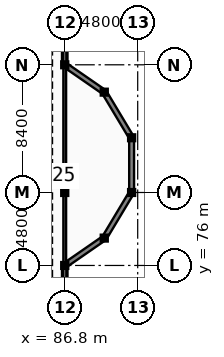
"""IFC4 building model, lengths in metres.
Left out: names, types, materials, properties, quantities, classifications, styles, units other than length and angle.
Written with IfcOpenShell. Run it as: python <this file> out.ifc"""

import sys

from ifc_helpers import new_model, si_unit, direction, frame, frame_2d, origin, origin_2d, place, context, subcontext, project, spatial, rectangle, i_section, extrude, element, fill, save


model = new_model("IFC4")
c1 = context("Model", 3, precision=1e-05, world=origin(), true_north=direction((0.0, 1.0)))
c2 = subcontext(c1, "Body", "Model", "MODEL_VIEW")
j1 = project(units=[si_unit("LENGTHUNIT", "METRE"), si_unit("PLANEANGLEUNIT", "RADIAN")], contexts=[c1])
p1 = place(None, origin())
s1 = spatial("IfcSite", under=j1, at=p1, CompositionType="ELEMENT")
p2 = place(p1, origin())
s2 = spatial("IfcBuilding", under=s1, at=p2, CompositionType="ELEMENT")
p3 = place(p2, frame((0.0, 0.0, 21.6)))
s3 = spatial("IfcBuildingStorey", under=s2, at=p3, CompositionType="ELEMENT", Elevation=21.6)
for number, where, z_axis, x_axis in (
    (1, (86.8, 76.0, 0.0), (0.0, 0.0, 1.0), (1.0, 0.0, 0.0)),
    (2, (86.8, 80.8, 0.0), (0.0, 0.0, 1.0), (1.0, 0.0, 0.0)),
    (3, (86.8, 89.2, 0.0), (0.0, 0.0, 1.0), (1.0, 0.0, 0.0)),
    (4, (89.4, 77.8, 0.0), (0.0, 0.0, 1.0), (1.0, 0.0, 0.0)),
    (5, (89.4, 87.4, 0.0), (0.0, 0.0, 1.0), (1.0, 0.0, 0.0)),
    (6, (91.2, 80.8, 0.0), (0.0, 0.0, 1.0), (1.0, 0.0, 0.0)),
    (7, (91.2, 84.4, 0.0), (0.0, 0.0, 1.0), (1.0, 0.0, 0.0)),
):
    element("IfcColumn", number, at=place(p3, frame(where, z_axis=z_axis, x_axis=x_axis)), inside=s3, PredefinedType="COLUMN", context=c2, shape_type="SweptSolid", body=[
        extrude(i_section(OverallWidth=0.3, OverallDepth=0.29, WebThickness=0.009, FlangeThickness=0.014, at=origin_2d()), origin(), (0.0, 0.0, 1.0), 3.6),
    ])
p4 = place(p3, frame((86.8, 76.0, 0.0), z_axis=(0.0, 0.0, 1.0), x_axis=(0.0, 1.0, 0.0)))
e8 = element("IfcWall", 8, at=p4, inside=s3, PredefinedType="PARTITIONING", context=c2, shape_type="SweptSolid", body=[
    extrude(rectangle(XDim=13.2, YDim=0.18, at=frame_2d((6.6, 0.0))), origin(), (0.0, 0.0, 1.0), 2.71),
])
p5 = place(p4, frame((5.8, 0.0, -0.01)))
e9 = element("IfcOpeningElement", 9, at=p5, cuts=e8, PredefinedType="OPENING", context=c2, shape_type="SweptSolid", body=[
    extrude(rectangle(XDim=1.6, YDim=2.21, at=frame_2d((0.8, 1.105))), frame((0.0, 0.1, 0.0), z_axis=(0.0, -1.0, 0.0), x_axis=(1.0, 0.0, 0.0)), (0.0, 0.0, 1.0), 0.2),
])
p6 = place(p3, frame((86.8, 67.6, 0.0), z_axis=(0.0, 0.0, 1.0), x_axis=(0.0, 1.0, 0.0)))
e10 = element("IfcWall", 10, at=p6, inside=s3, PredefinedType="SOLIDWALL", context=c2, shape_type="SweptSolid", body=[
    extrude(rectangle(XDim=8.4, YDim=0.36, at=frame_2d((4.2, 0.0))), origin(), (0.0, 0.0, 1.0), 2.71),
])
p7 = place(p6, frame((0.46, 0.0, 0.75)))
e11 = element("IfcOpeningElement", 11, at=p7, cuts=e10, PredefinedType="OPENING", context=c2, shape_type="SweptSolid", body=[
    extrude(rectangle(XDim=1.55, YDim=1.82, at=frame_2d((0.775, 0.91))), frame((0.0, 0.19, 0.0), z_axis=(0.0, -1.0, 0.0), x_axis=(1.0, 0.0, 0.0)), (0.0, 0.0, 1.0), 0.38),
])
p8 = place(p6, frame((6.26, 0.0, 0.75)))
e12 = element("IfcOpeningElement", 12, at=p8, cuts=e10, PredefinedType="OPENING", context=c2, shape_type="SweptSolid", body=[
    extrude(rectangle(XDim=1.55, YDim=1.82, at=frame_2d((0.775, 0.91))), frame((0.0, 0.19, 0.0), z_axis=(0.0, -1.0, 0.0), x_axis=(1.0, 0.0, 0.0)), (0.0, 0.0, 1.0), 0.38),
])
p9 = place(p3, frame((86.8, 89.2, 0.0), z_axis=(0.0, 0.0, 1.0), x_axis=(0.0, 1.0, 0.0)))
e13 = element("IfcWall", 13, at=p9, inside=s3, PredefinedType="SOLIDWALL", context=c2, shape_type="SweptSolid", body=[
    extrude(rectangle(XDim=8.4, YDim=0.36, at=frame_2d((4.2, 0.0))), origin(), (0.0, 0.0, 1.0), 2.71),
])
p10 = place(p9, frame((0.46, 0.0, 0.75)))
e14 = element("IfcOpeningElement", 14, at=p10, cuts=e13, PredefinedType="OPENING", context=c2, shape_type="SweptSolid", body=[
    extrude(rectangle(XDim=1.55, YDim=1.82, at=frame_2d((0.775, 0.91))), frame((0.0, 0.19, 0.0), z_axis=(0.0, -1.0, 0.0), x_axis=(1.0, 0.0, 0.0)), (0.0, 0.0, 1.0), 0.38),
])
p11 = place(p9, frame((6.26, 0.0, 0.75)))
e15 = element("IfcOpeningElement", 15, at=p11, cuts=e13, PredefinedType="OPENING", context=c2, shape_type="SweptSolid", body=[
    extrude(rectangle(XDim=1.55, YDim=1.82, at=frame_2d((0.775, 0.91))), frame((0.0, 0.19, 0.0), z_axis=(0.0, -1.0, 0.0), x_axis=(1.0, 0.0, 0.0)), (0.0, 0.0, 1.0), 0.38),
])
p12 = place(p3, frame((87.03, 76.159, 0.0), z_axis=(0.0, 0.0, 1.0), x_axis=(0.822192191644, 0.56920997883, 0.0)))
e16 = element("IfcWall", 16, at=p12, inside=s3, PredefinedType="SOLIDWALL", context=c2, shape_type="SweptSolid", body=[
    extrude(rectangle(XDim=0.22, YDim=0.24, at=frame_2d((0.11, 0.0))), origin(), (0.0, 0.0, 1.0), 2.71),
])
p13 = place(p3, frame((89.121, 77.606, 0.0), z_axis=(0.0, 0.0, 1.0), x_axis=(0.821855834467, 0.569695521619, 0.0)))
e17 = element("IfcWall", 17, at=p13, inside=s3, PredefinedType="SOLIDWALL", context=c2, shape_type="SweptSolid", body=[
    extrude(rectangle(XDim=0.34, YDim=0.24, at=frame_2d((0.17, 0.0))), origin(), (0.0, 0.0, 1.0), 2.71),
])
p14 = place(p3, frame((89.4, 77.8, 0.0), z_axis=(0.0, 0.0, 1.0), x_axis=(0.514812489021, 0.857302805984, 0.0)))
e18 = element("IfcWall", 18, at=p14, inside=s3, PredefinedType="SOLIDWALL", context=c2, shape_type="SweptSolid", body=[
    extrude(rectangle(XDim=0.34, YDim=0.24, at=frame_2d((0.17, 0.0))), origin(), (0.0, 0.0, 1.0), 2.71),
])
for number, where, z_axis, x_axis in (
    (19, (91.025, 80.509, 0.0), (0.0, 0.0, 1.0), (0.514, 0.858, 0.0)),
    (20, (91.2, 80.8, 0.0), (0.0, 0.0, 1.0), (0.0, 1.0, 0.0)),
    (21, (91.2, 84.06, 0.0), (0.0, 0.0, 1.0), (0.0, 1.0, 0.0)),
    (22, (91.2, 84.4, 0.0), (0.0, 0.0, 1.0), (-0.514, 0.858, 0.0)),
):
    element("IfcWall", number, at=place(p3, frame(where, z_axis=z_axis, x_axis=x_axis)), inside=s3, PredefinedType="SOLIDWALL", context=c2, shape_type="SweptSolid", body=[
        extrude(rectangle(XDim=0.34, YDim=0.24, at=frame_2d((0.17, 0.0))), origin(), (0.0, 0.0, 1.0), 2.71),
    ])
p15 = place(p3, frame((89.575, 87.108, 0.0), z_axis=(0.0, 0.0, 1.0), x_axis=(-0.514812489021, 0.857302805984, 0.0)))
e23 = element("IfcWall", 23, at=p15, inside=s3, PredefinedType="SOLIDWALL", context=c2, shape_type="SweptSolid", body=[
    extrude(rectangle(XDim=0.34, YDim=0.24, at=frame_2d((0.17, 0.0))), origin(), (0.0, 0.0, 1.0), 2.71),
])
p16 = place(p3, frame((89.4, 87.4, 0.0), z_axis=(0.0, 0.0, 1.0), x_axis=(-0.821855834467, 0.569695521619, 0.0)))
e24 = element("IfcWall", 24, at=p16, inside=s3, PredefinedType="SOLIDWALL", context=c2, shape_type="SweptSolid", body=[
    extrude(rectangle(XDim=0.34, YDim=0.24, at=frame_2d((0.17, 0.0))), origin(), (0.0, 0.0, 1.0), 2.71),
])
p17 = place(p3, frame((87.211, 88.915, 0.0), z_axis=(0.0, 0.0, 1.0), x_axis=(-0.822192191644, 0.56920997883, 0.0)))
e25 = element("IfcWall", 25, at=p17, inside=s3, PredefinedType="SOLIDWALL", context=c2, shape_type="SweptSolid", body=[
    extrude(rectangle(XDim=0.22, YDim=0.24, at=frame_2d((0.11, 0.0))), origin(), (0.0, 0.0, 1.0), 2.71),
])
p18 = place(p3, frame((86.8, 76.0, 3.6), z_axis=(0.0, 0.0, 1.0), x_axis=(0.8221699556, 0.569242096219, 0.0)))
e26 = element("IfcWall", 26, at=p18, inside=s3, PredefinedType="PARAPET", context=c2, shape_type="SweptSolid", body=[
    extrude(rectangle(XDim=3.162, YDim=0.32, at=frame_2d((1.581, 0.0))), origin(), (0.0, 0.0, 1.0), 0.95),
])
p19 = place(p3, frame((89.4, 77.8, 3.6), z_axis=(0.0, 0.0, 1.0), x_axis=(0.514506017516, 0.857486768376, 0.0)))
e27 = element("IfcWall", 27, at=p19, inside=s3, PredefinedType="PARAPET", context=c2, shape_type="SweptSolid", body=[
    extrude(rectangle(XDim=3.499, YDim=0.32, at=frame_2d((1.749, 0.0))), origin(), (0.0, 0.0, 1.0), 1.4),
])
p20 = place(p3, frame((91.2, 80.8, 3.6), z_axis=(0.0, 0.0, 1.0), x_axis=(0.0, 1.0, 0.0)))
e28 = element("IfcWall", 28, at=p20, inside=s3, PredefinedType="PARAPET", context=c2, shape_type="SweptSolid", body=[
    extrude(rectangle(XDim=3.6, YDim=0.32, at=frame_2d((1.8, 0.0))), origin(), (0.0, 0.0, 1.0), 1.4),
])
p21 = place(p3, frame((91.2, 84.4, 3.6), z_axis=(0.0, 0.0, 1.0), x_axis=(-0.514506017516, 0.857486768376, 0.0)))
e29 = element("IfcWall", 29, at=p21, inside=s3, PredefinedType="PARAPET", context=c2, shape_type="SweptSolid", body=[
    extrude(rectangle(XDim=3.499, YDim=0.32, at=frame_2d((1.749, 0.0))), origin(), (0.0, 0.0, 1.0), 1.4),
])
p22 = place(p3, frame((89.4, 87.4, 3.6), z_axis=(0.0, 0.0, 1.0), x_axis=(-0.8221699556, 0.569242096219, 0.0)))
e30 = element("IfcWall", 30, at=p22, inside=s3, PredefinedType="PARAPET", context=c2, shape_type="SweptSolid", body=[
    extrude(rectangle(XDim=3.162, YDim=0.32, at=frame_2d((1.581, 0.0))), origin(), (0.0, 0.0, 1.0), 0.95),
])
p23 = place(p3, frame((86.8, 89.2, 3.6), z_axis=(0.0, 0.0, 1.0), x_axis=(0.0, 1.0, 0.0)))
e31 = element("IfcWall", 31, at=p23, inside=s3, PredefinedType="PARAPET", context=c2, shape_type="SweptSolid", body=[
    extrude(rectangle(XDim=25.8, YDim=0.22, at=frame_2d((12.9, 0.0))), origin(), (0.0, 0.0, 1.0), 1.2),
])
p24 = place(p3, frame((86.8, 50.8, 3.6), z_axis=(0.0, 0.0, 1.0), x_axis=(0.0, 1.0, 0.0)))
e32 = element("IfcWall", 32, at=p24, inside=s3, PredefinedType="PARAPET", context=c2, shape_type="SweptSolid", body=[
    extrude(rectangle(XDim=25.2, YDim=0.22, at=frame_2d((12.6, 0.0))), origin(), (0.0, 0.0, 1.0), 1.2),
])
p25 = place(p5, frame((1.6, 0.0, 0.01), z_axis=(0.0, 0.0, 1.0), x_axis=(-1.0, 0.0, 0.0)))
e33 = element("IfcDoor", 33, at=p25, inside=s3, OperationType="DOUBLE_SWING_LEFT", PredefinedType="DOOR", context=c2, shape_type="SweptSolid", body=[
    extrude(rectangle(XDim=1.6, YDim=2.2, at=frame_2d((0.8, 1.1))), frame((0.0, 0.025, 0.0), z_axis=(0.0, -1.0, 0.0), x_axis=(1.0, 0.0, 0.0)), (0.0, 0.0, 1.0), 0.05),
])
fill(e9, e33)
p26 = place(p8, origin())
e34 = element("IfcWindow", 34, at=p26, inside=s3, PartitioningType="DOUBLE_PANEL_HORIZONTAL", PredefinedType="WINDOW", context=c2, shape_type="SweptSolid", body=[
    extrude(rectangle(XDim=1.55, YDim=1.82, at=frame_2d((0.775, 0.91))), frame((0.0, 0.03, 0.0), z_axis=(0.0, -1.0, 0.0), x_axis=(1.0, 0.0, 0.0)), (0.0, 0.0, 1.0), 0.06),
])
fill(e12, e34)
p27 = place(p10, origin())
e35 = element("IfcWindow", 35, at=p27, inside=s3, PartitioningType="DOUBLE_PANEL_HORIZONTAL", PredefinedType="WINDOW", context=c2, shape_type="SweptSolid", body=[
    extrude(rectangle(XDim=1.55, YDim=1.82, at=frame_2d((0.775, 0.91))), frame((0.0, 0.03, 0.0), z_axis=(0.0, -1.0, 0.0), x_axis=(1.0, 0.0, 0.0)), (0.0, 0.0, 1.0), 0.06),
])
fill(e14, e35)
save(model, sys.argv[1])
